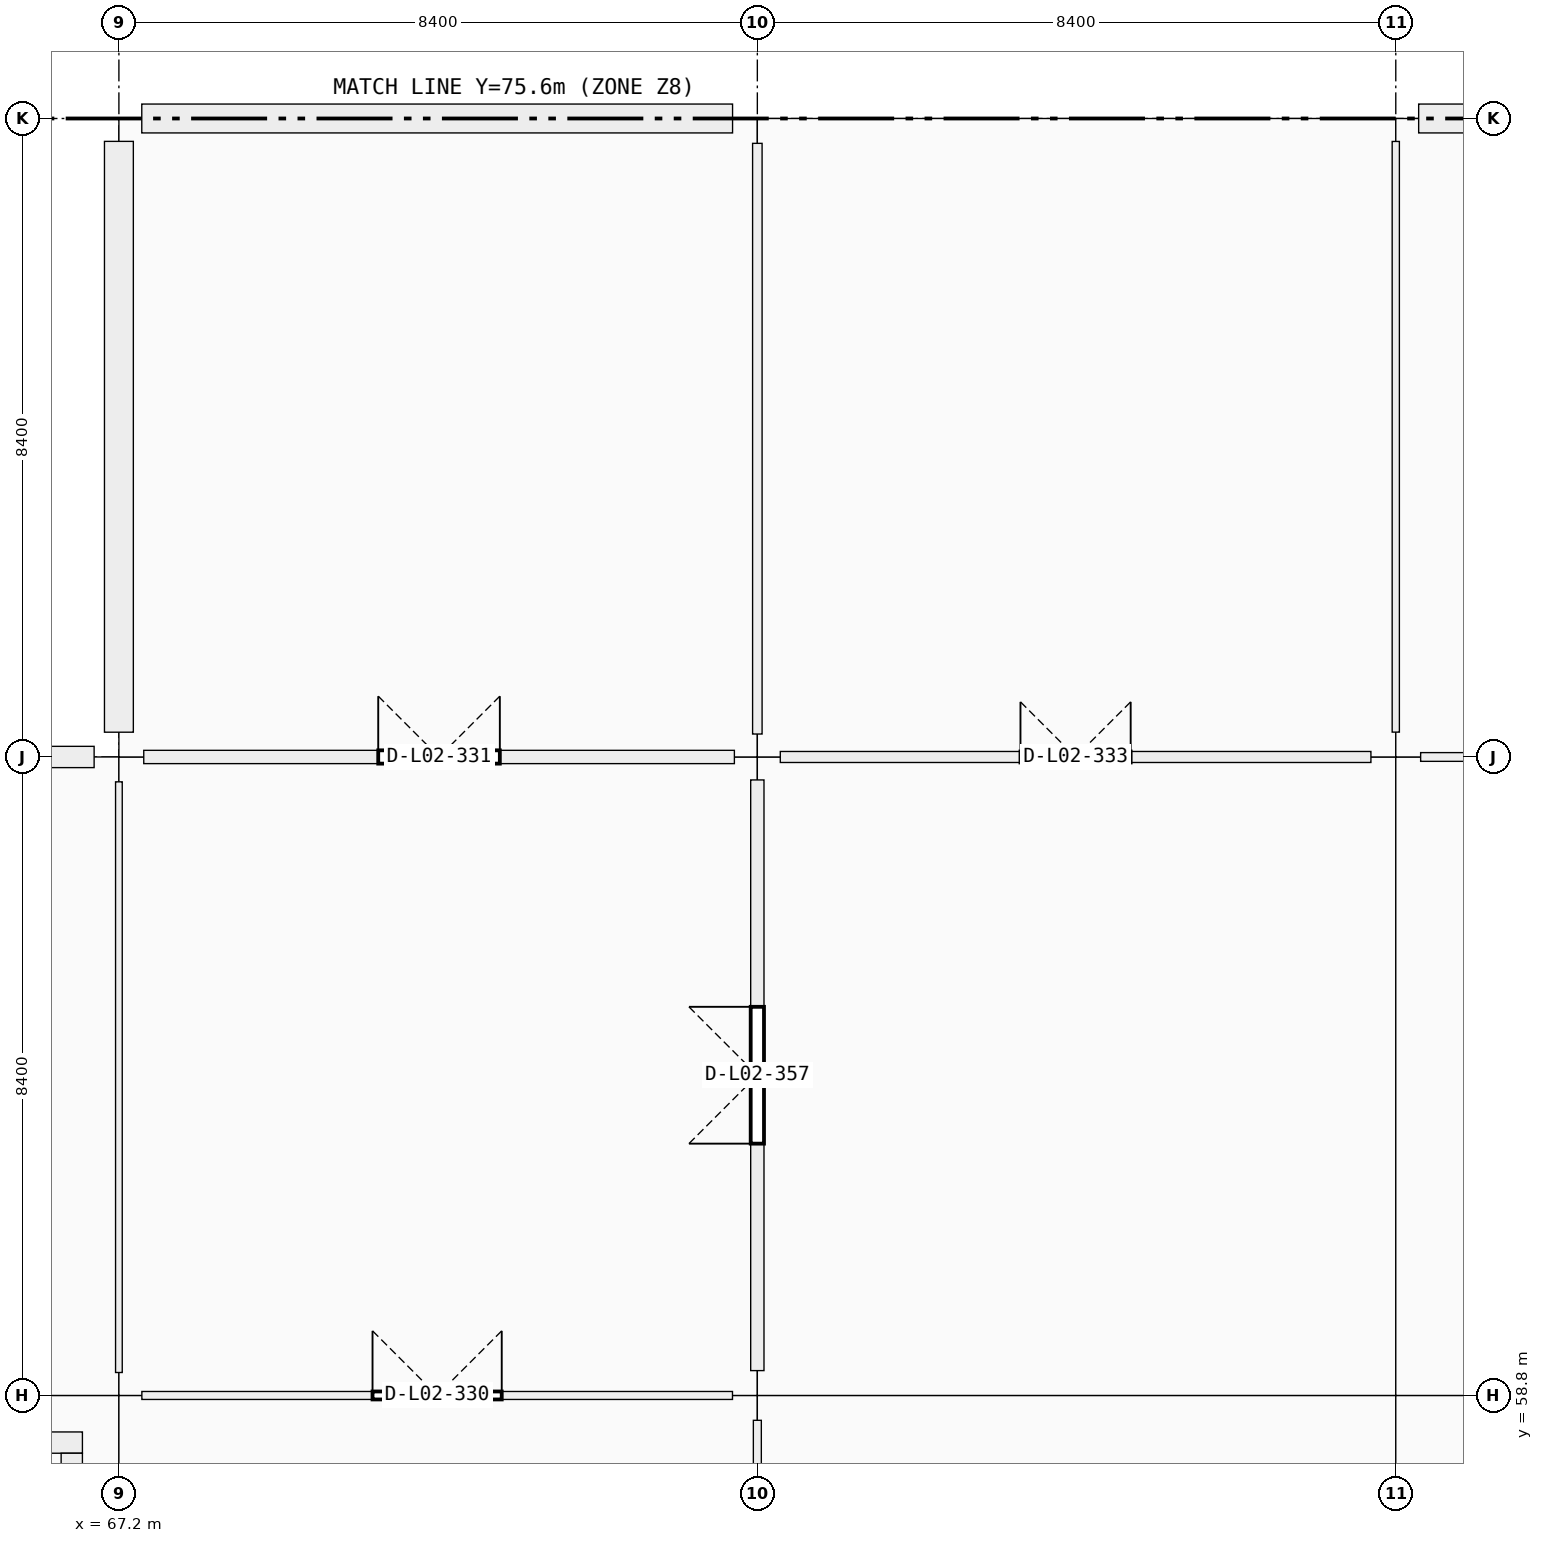
"""IFC4 building model, lengths in metres.
Left out: names, types, materials, properties, quantities, classifications, styles, units other than length and angle.
Written with IfcOpenShell. Run it as: python <this file> out.ifc"""

import sys

from ifc_helpers import new_model, si_unit, direction, frame, frame_2d, origin, origin_2d, place, context, subcontext, project, spatial, rectangle, extrude, element, fill, save


model = new_model("IFC4")
c1 = context("Model", 3, precision=1e-05, world=origin(), true_north=direction((0.0, 1.0)))
c2 = subcontext(c1, "Body", "Model", "MODEL_VIEW")
j1 = project(units=[si_unit("LENGTHUNIT", "METRE"), si_unit("PLANEANGLEUNIT", "RADIAN")], contexts=[c1])
p1 = place(None, origin())
s1 = spatial("IfcSite", under=j1, at=p1, CompositionType="ELEMENT")
p2 = place(p1, origin())
s2 = spatial("IfcBuilding", under=s1, at=p2, CompositionType="ELEMENT")
p3 = place(p2, frame((0.0, 0.0, 10.26)))
s3 = spatial("IfcBuildingStorey", under=s2, at=p3, CompositionType="ELEMENT", Elevation=10.26)
p4 = place(p3, frame((67.2, 58.8, 0.0), z_axis=(0.0, 0.0, 1.0), x_axis=(1.0, 0.0, 0.0)))
e1 = element("IfcColumn", 1, at=p4, inside=s3, PredefinedType="COLUMN", context=c2, shape_type="SweptSolid", body=[
    extrude(rectangle(XDim=0.6, YDim=0.6, at=origin_2d()), origin(), (0.0, 0.0, 1.0), 4.5),
])
p5 = place(p3, frame((67.2, 67.2, 0.0), z_axis=(0.0, 0.0, 1.0), x_axis=(1.0, 0.0, 0.0)))
e2 = element("IfcColumn", 2, at=p5, inside=s3, PredefinedType="COLUMN", context=c2, shape_type="SweptSolid", body=[
    extrude(rectangle(XDim=0.65, YDim=0.65, at=origin_2d()), origin(), (0.0, 0.0, 1.0), 4.5),
])
p6 = place(p3, frame((67.2, 75.6, 0.0), z_axis=(0.0, 0.0, 1.0), x_axis=(1.0, 0.0, 0.0)))
e3 = element("IfcColumn", 3, at=p6, inside=s3, PredefinedType="COLUMN", context=c2, shape_type="SweptSolid", body=[
    extrude(rectangle(XDim=0.6, YDim=0.6, at=origin_2d()), origin(), (0.0, 0.0, 1.0), 4.5),
])
p7 = place(p3, frame((75.6, 58.8, -0.3), z_axis=(0.0, 0.0, 1.0), x_axis=(1.0, 0.0, 0.0)))
e4 = element("IfcColumn", 4, at=p7, inside=s3, PredefinedType="COLUMN", context=c2, shape_type="SweptSolid", body=[
    extrude(rectangle(XDim=0.65, YDim=0.65, at=origin_2d()), origin(), (0.0, 0.0, 1.0), 4.8),
])
p8 = place(p3, frame((75.6, 67.2, 0.0), z_axis=(0.0, 0.0, 1.0), x_axis=(1.0, 0.0, 0.0)))
e5 = element("IfcColumn", 5, at=p8, inside=s3, PredefinedType="COLUMN", context=c2, shape_type="SweptSolid", body=[
    extrude(rectangle(XDim=0.6, YDim=0.6, at=origin_2d()), origin(), (0.0, 0.0, 1.0), 4.5),
])
for number, where, z_axis, x_axis in (
    (6, (75.6, 75.6, 0.0), (0.0, 0.0, 1.0), (1.0, 0.0, 0.0)),
    (7, (84.0, 67.2, 0.0), (0.0, 0.0, 1.0), (1.0, 0.0, 0.0)),
):
    element("IfcColumn", number, at=place(p3, frame(where, z_axis=z_axis, x_axis=x_axis)), inside=s3, PredefinedType="COLUMN", context=c2, shape_type="SweptSolid", body=[
        extrude(rectangle(XDim=0.65, YDim=0.65, at=origin_2d()), origin(), (0.0, 0.0, 1.0), 4.5),
    ])
p9 = place(p3, frame((84.0, 75.6, 0.0), z_axis=(0.0, 0.0, 1.0), x_axis=(1.0, 0.0, 0.0)))
e8 = element("IfcColumn", 8, at=p9, inside=s3, PredefinedType="COLUMN", context=c2, shape_type="SweptSolid", body=[
    extrude(rectangle(XDim=0.6, YDim=0.6, at=origin_2d()), origin(), (0.0, 0.0, 1.0), 4.5),
])
p10 = place(p3, frame((59.151, 67.2, 0.0), z_axis=(0.0, 0.0, 1.0), x_axis=(1.0, 0.0, 0.0)))
e9 = element("IfcWall", 9, at=p10, inside=s3, PredefinedType="SOLIDWALL", context=c2, shape_type="SweptSolid", body=[
    extrude(rectangle(XDim=7.723, YDim=0.28, at=frame_2d((3.862, 0.0))), origin(), (0.0, 0.0, 1.0), 3.54),
])
p11 = place(p10, frame((2.261, 0.0, 0.9)))
e10 = element("IfcOpeningElement", 10, at=p11, cuts=e9, PredefinedType="OPENING", context=c2, shape_type="SweptSolid", body=[
    extrude(rectangle(XDim=3.2, YDim=1.75, at=frame_2d((1.6, 0.875))), frame((0.0, 0.14, 0.0), z_axis=(0.0, -1.0, 0.0), x_axis=(1.0, 0.0, 0.0)), (0.0, 0.0, 1.0), 0.28),
])
p12 = place(p3, frame((67.2, 67.526, 0.0), z_axis=(0.0, 0.0, 1.0), x_axis=(0.0, 1.0, 0.0)))
e11 = element("IfcWall", 11, at=p12, inside=s3, PredefinedType="SOLIDWALL", context=c2, shape_type="SweptSolid", body=[
    extrude(rectangle(XDim=7.773, YDim=0.38, at=frame_2d((3.887, 0.0))), origin(), (0.0, 0.0, 1.0), 3.54),
])
p13 = place(p3, frame((67.501, 75.6, 0.0), z_axis=(0.0, 0.0, 1.0), x_axis=(1.0, 0.0, 0.0)))
e12 = element("IfcWall", 12, at=p13, inside=s3, PredefinedType="SOLIDWALL", context=c2, shape_type="SweptSolid", body=[
    extrude(rectangle(XDim=7.773, YDim=0.38, at=frame_2d((3.886, 0.0))), origin(), (0.0, 0.0, 1.0), 3.54),
])
p14 = place(p3, frame((84.301, 75.6, 0.0), z_axis=(0.0, 0.0, 1.0), x_axis=(1.0, 0.0, 0.0)))
e13 = element("IfcWall", 13, at=p14, inside=s3, PredefinedType="SOLIDWALL", context=c2, shape_type="SweptSolid", body=[
    extrude(rectangle(XDim=7.773, YDim=0.38, at=frame_2d((3.886, 0.0))), origin(), (0.0, 0.0, 1.0), 3.54),
])
p15 = place(p14, frame((3.136, 0.0, 1.55)))
e14 = element("IfcOpeningElement", 14, at=p15, cuts=e13, PredefinedType="OPENING", context=c2, shape_type="SweptSolid", body=[
    extrude(rectangle(XDim=1.5, YDim=1.2, at=frame_2d((0.75, 0.6))), frame((0.0, 0.19, 0.0), z_axis=(0.0, -1.0, 0.0), x_axis=(1.0, 0.0, 0.0)), (0.0, 0.0, 1.0), 0.38),
])
p16 = place(p3, frame((59.28, 58.18, 0.0), z_axis=(0.0, 0.0, 1.0), x_axis=(1.0, 0.0, 0.0)))
e15 = element("IfcWall", 15, at=p16, inside=s3, PredefinedType="SHEAR", context=c2, shape_type="SweptSolid", body=[
    extrude(rectangle(XDim=7.44, YDim=0.28, at=frame_2d((3.72, 0.0))), origin(), (0.0, 0.0, 1.0), 4.5),
])
p17 = place(p3, frame((66.58, 58.04, 0.0), z_axis=(0.0, 0.0, 1.0), x_axis=(0.0, -1.0, 0.0)))
e16 = element("IfcWall", 16, at=p17, inside=s3, PredefinedType="SHEAR", context=c2, shape_type="SweptSolid", body=[
    extrude(rectangle(XDim=6.88, YDim=0.28, at=frame_2d((3.44, 0.0))), origin(), (0.0, 0.0, 1.0), 4.5),
])
p18 = place(p17, frame((3.99, 0.0, 0.0)))
e17 = element("IfcOpeningElement", 17, at=p18, cuts=e16, PredefinedType="OPENING", context=c2, shape_type="SweptSolid", body=[
    extrude(rectangle(XDim=1.5, YDim=2.15, at=frame_2d((0.75, 1.075))), frame((0.0, 0.14, 0.0), z_axis=(0.0, -1.0, 0.0), x_axis=(1.0, 0.0, 0.0)), (0.0, 0.0, 1.0), 0.28),
])
p19 = place(p3, frame((67.502, 58.8, 0.0), z_axis=(0.0, 0.0, 1.0), x_axis=(1.0, 0.0, 0.0)))
e18 = element("IfcWall", 18, at=p19, inside=s3, PredefinedType="PARTITIONING", context=c2, shape_type="SweptSolid", body=[
    extrude(rectangle(XDim=7.771, YDim=0.105, at=frame_2d((3.885, 0.0))), origin(), (0.0, 0.0, 1.0), 3.37),
])
p20 = place(p19, frame((3.035, 0.0, 0.0)))
e19 = element("IfcOpeningElement", 19, at=p20, cuts=e18, PredefinedType="OPENING", context=c2, shape_type="SweptSolid", body=[
    extrude(rectangle(XDim=1.7, YDim=2.35, at=frame_2d((0.85, 1.175))), frame((0.0, 0.052, 0.0), z_axis=(0.0, -1.0, 0.0), x_axis=(1.0, 0.0, 0.0)), (0.0, 0.0, 1.0), 0.105),
])
p21 = place(p3, frame((67.527, 67.2, 0.0), z_axis=(0.0, 0.0, 1.0), x_axis=(1.0, 0.0, 0.0)))
e20 = element("IfcWall", 20, at=p21, inside=s3, PredefinedType="PARTITIONING", context=c2, shape_type="SweptSolid", body=[
    extrude(rectangle(XDim=7.771, YDim=0.175, at=frame_2d((3.885, 0.0))), origin(), (0.0, 0.0, 1.0), 3.37),
])
p22 = place(p21, frame((3.085, 0.0, 0.0)))
e21 = element("IfcOpeningElement", 21, at=p22, cuts=e20, PredefinedType="OPENING", context=c2, shape_type="SweptSolid", body=[
    extrude(rectangle(XDim=1.6, YDim=2.3, at=frame_2d((0.8, 1.15))), frame((0.0, 0.087, 0.0), z_axis=(0.0, -1.0, 0.0), x_axis=(1.0, 0.0, 0.0)), (0.0, 0.0, 1.0), 0.175),
])
p23 = place(p3, frame((75.902, 67.2, 0.0), z_axis=(0.0, 0.0, 1.0), x_axis=(1.0, 0.0, 0.0)))
e22 = element("IfcWall", 22, at=p23, inside=s3, PredefinedType="PARTITIONING", context=c2, shape_type="SweptSolid", body=[
    extrude(rectangle(XDim=7.771, YDim=0.145, at=frame_2d((3.885, 0.0))), origin(), (0.0, 0.0, 1.0), 3.37),
])
p24 = place(p23, frame((3.16, 0.0, 0.0)))
e23 = element("IfcOpeningElement", 23, at=p24, cuts=e22, PredefinedType="OPENING", context=c2, shape_type="SweptSolid", body=[
    extrude(rectangle(XDim=1.45, YDim=2.2, at=frame_2d((0.725, 1.1))), frame((0.0, 0.073, 0.0), z_axis=(0.0, -1.0, 0.0), x_axis=(1.0, 0.0, 0.0)), (0.0, 0.0, 1.0), 0.145),
])
p25 = place(p3, frame((84.327, 67.2, 0.0), z_axis=(0.0, 0.0, 1.0), x_axis=(1.0, 0.0, 0.0)))
e24 = element("IfcWall", 24, at=p25, inside=s3, PredefinedType="PARTITIONING", context=c2, shape_type="SweptSolid", body=[
    extrude(rectangle(XDim=7.771, YDim=0.115, at=frame_2d((3.885, 0.0))), origin(), (0.0, 0.0, 1.0), 3.37),
])
p26 = place(p25, frame((3.21, 0.0, 0.0)))
e25 = element("IfcOpeningElement", 25, at=p26, cuts=e24, PredefinedType="OPENING", context=c2, shape_type="SweptSolid", body=[
    extrude(rectangle(XDim=1.35, YDim=2.2, at=frame_2d((0.675, 1.1))), frame((0.0, 0.058, 0.0), z_axis=(0.0, -1.0, 0.0), x_axis=(1.0, 0.0, 0.0)), (0.0, 0.0, 1.0), 0.115),
])
p27 = place(p3, frame((67.2, 59.102, 0.0), z_axis=(0.0, 0.0, 1.0), x_axis=(0.0, 1.0, 0.0)))
e26 = element("IfcWall", 26, at=p27, inside=s3, PredefinedType="PARTITIONING", context=c2, shape_type="SweptSolid", body=[
    extrude(rectangle(XDim=7.771, YDim=0.088, at=frame_2d((3.885, 0.0))), origin(), (0.0, 0.0, 1.0), 3.37),
])
p28 = place(p27, frame((3.415, 0.0, 0.0)))
e27 = element("IfcOpeningElement", 27, at=p28, cuts=e26, PredefinedType="OPENING", context=c2, shape_type="SweptSolid", body=[
    extrude(rectangle(XDim=0.94, YDim=2.15, at=frame_2d((0.47, 1.075))), frame((0.0, 0.044, 0.0), z_axis=(0.0, -1.0, 0.0), x_axis=(1.0, 0.0, 0.0)), (0.0, 0.0, 1.0), 0.088),
])
p29 = place(p3, frame((75.6, 50.702, 0.0), z_axis=(0.0, 0.0, 1.0), x_axis=(0.0, 1.0, 0.0)))
e28 = element("IfcWall", 28, at=p29, inside=s3, PredefinedType="PARTITIONING", context=c2, shape_type="SweptSolid", body=[
    extrude(rectangle(XDim=7.771, YDim=0.105, at=frame_2d((3.885, 0.0))), origin(), (0.0, 0.0, 1.0), 3.37),
])
p30 = place(p29, frame((3.21, 0.0, 0.0)))
e29 = element("IfcOpeningElement", 29, at=p30, cuts=e28, PredefinedType="OPENING", context=c2, shape_type="SweptSolid", body=[
    extrude(rectangle(XDim=1.35, YDim=2.2, at=frame_2d((0.675, 1.1))), frame((0.0, 0.052, 0.0), z_axis=(0.0, -1.0, 0.0), x_axis=(1.0, 0.0, 0.0)), (0.0, 0.0, 1.0), 0.105),
])
p31 = place(p3, frame((75.6, 59.127, 0.0), z_axis=(0.0, 0.0, 1.0), x_axis=(0.0, 1.0, 0.0)))
e30 = element("IfcWall", 30, at=p31, inside=s3, PredefinedType="PARTITIONING", context=c2, shape_type="SweptSolid", body=[
    extrude(rectangle(XDim=7.771, YDim=0.175, at=frame_2d((3.885, 0.0))), origin(), (0.0, 0.0, 1.0), 3.37),
])
p32 = place(p31, frame((2.986, 0.0, 0.0)))
e31 = element("IfcOpeningElement", 31, at=p32, cuts=e30, PredefinedType="OPENING", context=c2, shape_type="SweptSolid", body=[
    extrude(rectangle(XDim=1.8, YDim=2.4, at=frame_2d((0.9, 1.2))), frame((0.0, 0.087, 0.0), z_axis=(0.0, -1.0, 0.0), x_axis=(1.0, 0.0, 0.0)), (0.0, 0.0, 1.0), 0.175),
])
p33 = place(p3, frame((75.6, 67.502, 0.0), z_axis=(0.0, 0.0, 1.0), x_axis=(0.0, 1.0, 0.0)))
e32 = element("IfcWall", 32, at=p33, inside=s3, PredefinedType="PARTITIONING", context=c2, shape_type="SweptSolid", body=[
    extrude(rectangle(XDim=7.771, YDim=0.125, at=frame_2d((3.885, 0.0))), origin(), (0.0, 0.0, 1.0), 3.37),
])
p34 = place(p33, frame((3.425, 0.0, 0.0)))
e33 = element("IfcOpeningElement", 33, at=p34, cuts=e32, PredefinedType="OPENING", context=c2, shape_type="SweptSolid", body=[
    extrude(rectangle(XDim=0.92, YDim=2.15, at=frame_2d((0.46, 1.075))), frame((0.0, 0.062, 0.0), z_axis=(0.0, -1.0, 0.0), x_axis=(1.0, 0.0, 0.0)), (0.0, 0.0, 1.0), 0.125),
])
p35 = place(p3, frame((84.0, 67.527, 0.0), z_axis=(0.0, 0.0, 1.0), x_axis=(0.0, 1.0, 0.0)))
e34 = element("IfcWall", 34, at=p35, inside=s3, PredefinedType="PARTITIONING", context=c2, shape_type="SweptSolid", body=[
    extrude(rectangle(XDim=7.771, YDim=0.095, at=frame_2d((3.885, 0.0))), origin(), (0.0, 0.0, 1.0), 3.37),
])
p36 = place(p35, frame((3.361, 0.0, 0.0)))
e35 = element("IfcOpeningElement", 35, at=p36, cuts=e34, PredefinedType="OPENING", context=c2, shape_type="SweptSolid", body=[
    extrude(rectangle(XDim=1.05, YDim=2.12, at=frame_2d((0.525, 1.06))), frame((0.0, 0.047, 0.0), z_axis=(0.0, -1.0, 0.0), x_axis=(1.0, 0.0, 0.0)), (0.0, 0.0, 1.0), 0.095),
])
p37 = place(p20, origin())
e36 = element("IfcDoor", 36, at=p37, inside=s3, OperationType="DOUBLE_DOOR_SINGLE_SWING", PredefinedType="DOOR", context=c2, shape_type="SweptSolid", body=[
    extrude(rectangle(XDim=1.7, YDim=2.35, at=frame_2d((0.85, 1.175))), frame((0.0, 0.025, 0.0), z_axis=(0.0, -1.0, 0.0), x_axis=(1.0, 0.0, 0.0)), (0.0, 0.0, 1.0), 0.05),
])
fill(e19, e36)
p38 = place(p22, origin())
e37 = element("IfcDoor", 37, at=p38, inside=s3, OperationType="DOUBLE_DOOR_SINGLE_SWING", PredefinedType="DOOR", context=c2, shape_type="SweptSolid", body=[
    extrude(rectangle(XDim=1.6, YDim=2.3, at=frame_2d((0.8, 1.15))), frame((0.0, 0.025, 0.0), z_axis=(0.0, -1.0, 0.0), x_axis=(1.0, 0.0, 0.0)), (0.0, 0.0, 1.0), 0.05),
])
fill(e21, e37)
p39 = place(p24, origin())
e38 = element("IfcDoor", 38, at=p39, inside=s3, OperationType="DOUBLE_DOOR_SINGLE_SWING", PredefinedType="DOOR", context=c2, shape_type="SweptSolid", body=[
    extrude(rectangle(XDim=1.45, YDim=2.2, at=frame_2d((0.725, 1.1))), frame((0.0, 0.025, 0.0), z_axis=(0.0, -1.0, 0.0), x_axis=(1.0, 0.0, 0.0)), (0.0, 0.0, 1.0), 0.05),
])
fill(e23, e38)
p40 = place(p32, origin())
e39 = element("IfcDoor", 39, at=p40, inside=s3, OperationType="DOUBLE_DOOR_SINGLE_SWING", PredefinedType="DOOR", context=c2, shape_type="SweptSolid", body=[
    extrude(rectangle(XDim=1.8, YDim=2.4, at=frame_2d((0.9, 1.2))), frame((0.0, 0.025, 0.0), z_axis=(0.0, -1.0, 0.0), x_axis=(1.0, 0.0, 0.0)), (0.0, 0.0, 1.0), 0.05),
])
fill(e31, e39)
p41 = place(p28, origin())
e40 = element("IfcDoor", 40, at=p41, inside=s3, OperationType="SINGLE_SWING_RIGHT", PredefinedType="DOOR", context=c2, shape_type="SweptSolid", body=[
    extrude(rectangle(XDim=0.94, YDim=2.15, at=frame_2d((0.47, 1.075))), frame((0.0, 0.025, 0.0), z_axis=(0.0, -1.0, 0.0), x_axis=(1.0, 0.0, 0.0)), (0.0, 0.0, 1.0), 0.05),
])
fill(e27, e40)
p42 = place(p34, origin())
e41 = element("IfcDoor", 41, at=p42, inside=s3, OperationType="SINGLE_SWING_LEFT", PredefinedType="DOOR", context=c2, shape_type="SweptSolid", body=[
    extrude(rectangle(XDim=0.92, YDim=2.15, at=frame_2d((0.46, 1.075))), frame((0.0, 0.025, 0.0), z_axis=(0.0, -1.0, 0.0), x_axis=(1.0, 0.0, 0.0)), (0.0, 0.0, 1.0), 0.05),
])
fill(e33, e41)
p43 = place(p36, origin())
e42 = element("IfcDoor", 42, at=p43, inside=s3, OperationType="SINGLE_SWING_RIGHT", PredefinedType="DOOR", context=c2, shape_type="SweptSolid", body=[
    extrude(rectangle(XDim=1.05, YDim=2.12, at=frame_2d((0.525, 1.06))), frame((0.0, 0.025, 0.0), z_axis=(0.0, -1.0, 0.0), x_axis=(1.0, 0.0, 0.0)), (0.0, 0.0, 1.0), 0.05),
])
fill(e35, e42)
save(model, sys.argv[1])
